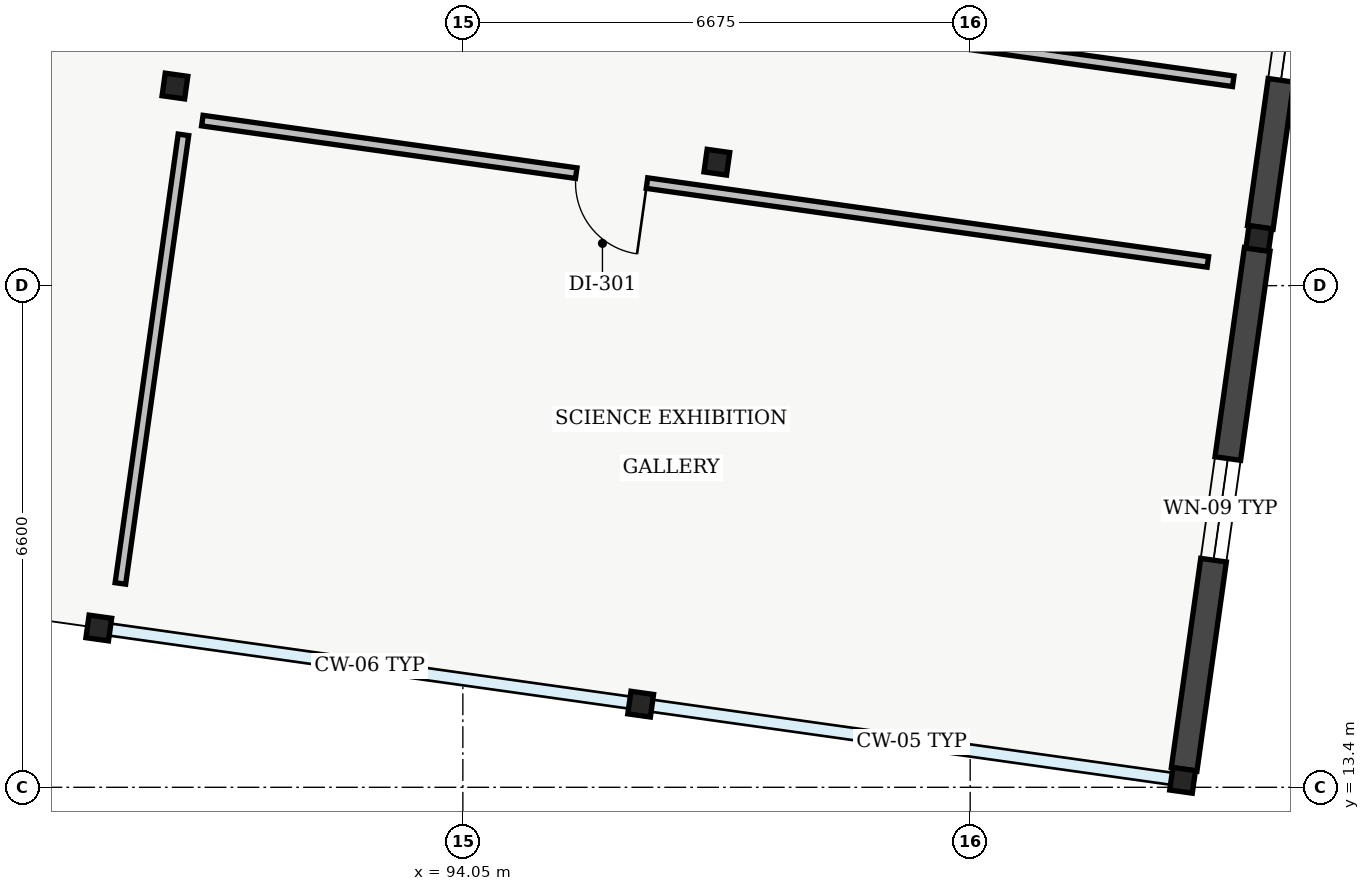
"""IFC4 building model, lengths in metres.
Left out: names, types, materials, properties, quantities, classifications, styles, units other than length and angle.
Written with IfcOpenShell. Run it as: python <this file> out.ifc"""

import sys

from ifc_helpers import new_model, si_unit, direction, frame, frame_2d, origin, origin_2d, place, context, subcontext, project, spatial, rectangle, i_section, extrude, element, fill, save


model = new_model("IFC4")
c1 = context("Model", 3, precision=1e-05, world=origin(), true_north=direction((0.0, 1.0)))
c2 = subcontext(c1, "Body", "Model", "MODEL_VIEW")
j1 = project(units=[si_unit("LENGTHUNIT", "METRE"), si_unit("PLANEANGLEUNIT", "RADIAN")], contexts=[c1])
p1 = place(None, origin())
s1 = spatial("IfcSite", under=j1, at=p1, CompositionType="ELEMENT")
p2 = place(p1, origin())
s2 = spatial("IfcBuilding", under=s1, at=p2, CompositionType="ELEMENT")
p3 = place(p2, origin())
s3 = spatial("IfcBuildingStorey", under=s2, at=p3, CompositionType="ELEMENT", Elevation=0.0)
for number, where, z_axis, x_axis in (
    (1, (89.26, 15.496, 0.0), (0.0, 0.0, 1.0), (0.99, -0.139, 0.0)),
    (2, (90.262, 22.626, 0.0), (0.0, 0.0, 1.0), (0.99, -0.139, 0.0)),
    (3, (96.39, 14.494, 0.0), (0.0, 0.0, 1.0), (0.99, -0.139, 0.0)),
    (4, (97.392, 21.624, 0.0), (0.0, 0.0, 1.0), (0.99, -0.139, 0.0)),
    (5, (103.52, 13.492, 0.0), (0.0, 0.0, 1.0), (0.99, -0.139, 0.0)),
    (6, (104.522, 20.622, 0.0), (0.0, 0.0, 1.0), (0.99, -0.139, 0.0)),
):
    element("IfcColumn", number, at=place(p3, frame(where, z_axis=z_axis, x_axis=x_axis)), inside=s3, PredefinedType="COLUMN", context=c2, shape_type="SweptSolid", body=[
        extrude(i_section(OverallWidth=0.3, OverallDepth=0.3, WebThickness=0.011, FlangeThickness=0.019, at=origin_2d()), origin(), (0.0, 0.0, 1.0), 4.92),
    ])
p4 = place(p3, frame((105.504, 27.608, 0.0), z_axis=(0.0, 0.0, 1.0), x_axis=(-0.139170380644, -0.990268451053, 0.0)))
e7 = element("IfcWall", 7, at=p4, inside=s3, PredefinedType="SOLIDWALL", context=c2, shape_type="SweptSolid", body=[
    extrude(rectangle(XDim=6.91, YDim=0.34, at=frame_2d((3.455, 0.0))), origin(), (0.0, 0.0, 1.0), 4.705),
])
p5 = place(p4, frame((1.955, 0.0, 0.95)))
e8 = element("IfcOpeningElement", 8, at=p5, cuts=e7, PredefinedType="OPENING", context=c2, shape_type="SweptSolid", body=[
    extrude(rectangle(XDim=3.0, YDim=1.65, at=frame_2d((1.5, 0.825))), frame((0.0, 0.17, 0.0), z_axis=(0.0, -1.0, 0.0), x_axis=(1.0, 0.0, 0.0)), (0.0, 0.0, 1.0), 0.34),
])
p6 = place(p3, frame((104.502, 20.478, 0.0), z_axis=(0.0, 0.0, 1.0), x_axis=(-0.139205027475, -0.990263581238, 0.0)))
e9 = element("IfcWall", 9, at=p6, inside=s3, PredefinedType="SOLIDWALL", context=c2, shape_type="SweptSolid", body=[
    extrude(rectangle(XDim=6.91, YDim=0.34, at=frame_2d((3.455, 0.0))), origin(), (0.0, 0.0, 1.0), 4.705),
])
p7 = place(p6, frame((2.78, 0.0, 0.95)))
e10 = element("IfcOpeningElement", 10, at=p7, cuts=e9, PredefinedType="OPENING", context=c2, shape_type="SweptSolid", body=[
    extrude(rectangle(XDim=1.35, YDim=1.8, at=frame_2d((0.675, 0.9))), frame((0.0, 0.17, 0.0), z_axis=(0.0, -1.0, 0.0), x_axis=(1.0, 0.0, 0.0)), (0.0, 0.0, 1.0), 0.34),
])
p8 = place(p3, frame((103.852, 20.312, 0.0), z_axis=(0.0, 0.0, 1.0), x_axis=(-0.990267836617, 0.139174752605, 0.0)))
e11 = element("IfcWall", 11, at=p8, inside=s3, PredefinedType="PARTITIONING", context=c2, shape_type="SweptSolid", body=[
    extrude(rectangle(XDim=13.36, YDim=0.14, at=frame_2d((6.68, 0.0))), origin(), (0.0, 0.0, 1.0), 4.55),
])
p9 = place(p8, frame((7.452, 0.0, 0.0)))
e12 = element("IfcOpeningElement", 12, at=p9, cuts=e11, PredefinedType="OPENING", context=c2, shape_type="SweptSolid", body=[
    extrude(rectangle(XDim=0.94, YDim=2.12, at=frame_2d((0.47, 1.06))), frame((0.0, 0.07, 0.0), z_axis=(0.0, -1.0, 0.0), x_axis=(1.0, 0.0, 0.0)), (0.0, 0.0, 1.0), 0.14),
])
p10 = place(p3, frame((90.374, 21.984, 0.0), z_axis=(0.0, 0.0, 1.0), x_axis=(-0.139190185652, -0.990265667494, 0.0)))
e13 = element("IfcWall", 13, at=p10, inside=s3, PredefinedType="PARTITIONING", context=c2, shape_type="SweptSolid", body=[
    extrude(rectangle(XDim=5.96, YDim=0.14, at=frame_2d((2.98, 0.0))), origin(), (0.0, 0.0, 1.0), 4.55),
])
p11 = place(p3, frame((98.086, 23.546, 0.0), z_axis=(0.0, 0.0, 1.0), x_axis=(0.990264860737, -0.139195925191, 0.0)))
e14 = element("IfcWall", 14, at=p11, inside=s3, PredefinedType="PARTITIONING", context=c2, shape_type="SweptSolid", body=[
    extrude(rectangle(XDim=6.16, YDim=0.14, at=frame_2d((3.08, 0.0))), origin(), (0.0, 0.0, 1.0), 4.55),
])
p12 = place(p5, origin())
e15 = element("IfcWindow", 15, at=p12, inside=s3, PartitioningType="SINGLE_PANEL", PredefinedType="WINDOW", context=c2, shape_type="SweptSolid", body=[
    extrude(rectangle(XDim=3.0, YDim=1.65, at=frame_2d((1.5, 0.825))), frame((0.0, 0.03, 0.0), z_axis=(0.0, -1.0, 0.0), x_axis=(1.0, 0.0, 0.0)), (0.0, 0.0, 1.0), 0.06),
])
fill(e8, e15)
p13 = place(p7, origin())
e16 = element("IfcWindow", 16, at=p13, inside=s3, PartitioningType="SINGLE_PANEL", PredefinedType="WINDOW", context=c2, shape_type="SweptSolid", body=[
    extrude(rectangle(XDim=1.35, YDim=1.8, at=frame_2d((0.675, 0.9))), frame((0.0, 0.03, 0.0), z_axis=(0.0, -1.0, 0.0), x_axis=(1.0, 0.0, 0.0)), (0.0, 0.0, 1.0), 0.06),
])
fill(e10, e16)
p14 = place(p9, origin())
e17 = element("IfcDoor", 17, at=p14, inside=s3, OperationType="SINGLE_SWING_LEFT", PredefinedType="DOOR", context=c2, shape_type="SweptSolid", body=[
    extrude(rectangle(XDim=0.94, YDim=2.12, at=frame_2d((0.47, 1.06))), frame((0.0, 0.025, 0.0), z_axis=(0.0, -1.0, 0.0), x_axis=(1.0, 0.0, 0.0)), (0.0, 0.0, 1.0), 0.05),
])
fill(e12, e17)
save(model, sys.argv[1])
